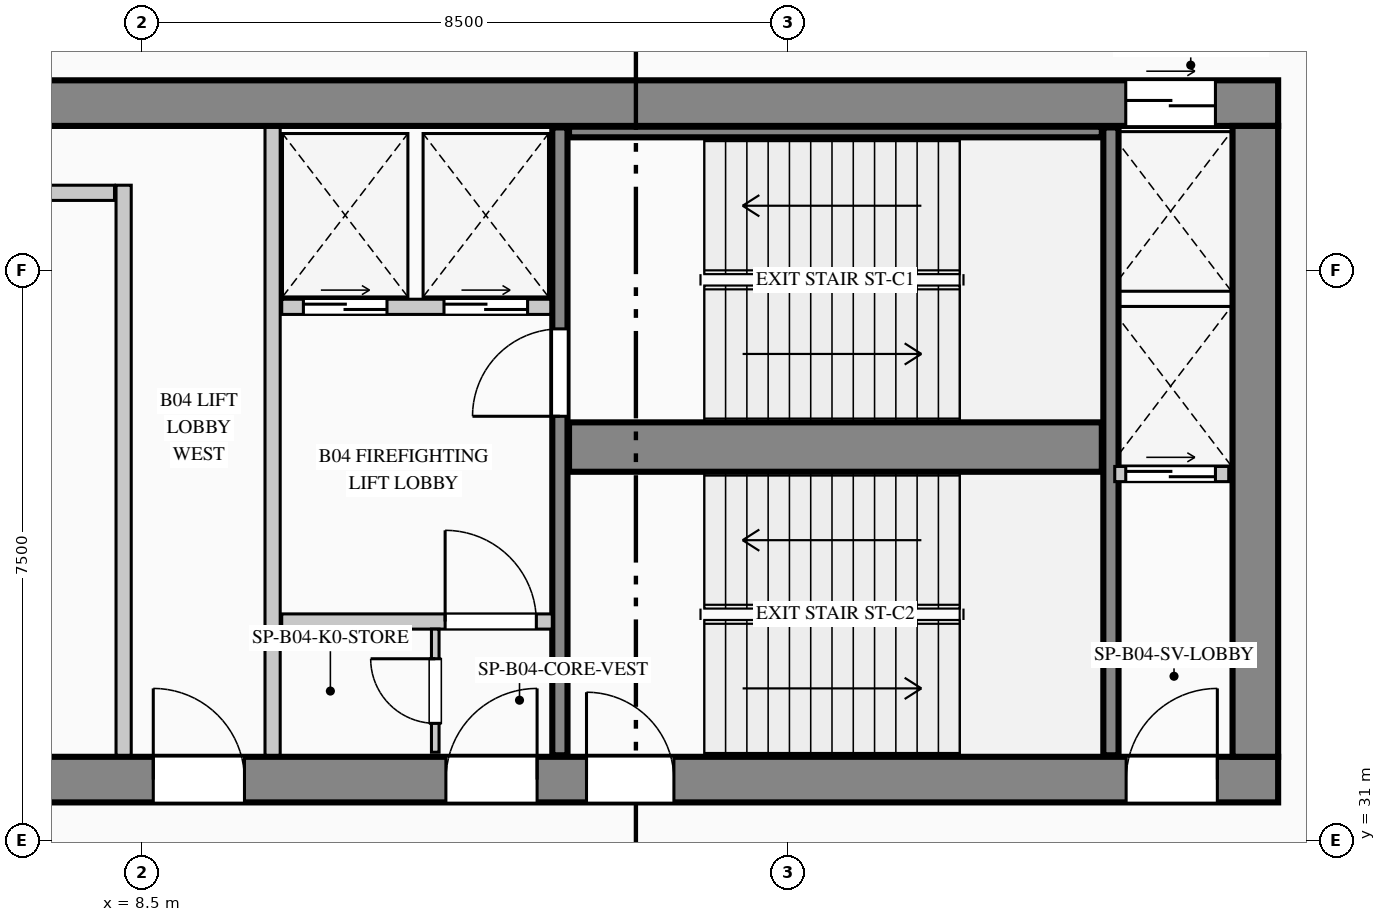
"""IFC4 building model, lengths in metres.
Left out: names, types, materials, properties, quantities, classifications, styles, units other than length and angle.
Written with IfcOpenShell. Run it as: python <this file> out.ifc"""

import sys

from ifc_helpers import new_model, si_unit, direction, frame, frame_2d, origin, place, context, subcontext, project, spatial, rectangle, extrude, element, fill, save


model = new_model("IFC4")
c1 = context("Model", 3, precision=1e-05, world=origin(), true_north=direction((0.0, 1.0)))
c2 = subcontext(c1, "Body", "Model", "MODEL_VIEW")
j1 = project(units=[si_unit("LENGTHUNIT", "METRE"), si_unit("PLANEANGLEUNIT", "RADIAN")], contexts=[c1])
p1 = place(None, origin())
s1 = spatial("IfcSite", under=j1, at=p1, CompositionType="ELEMENT")
p2 = place(p1, origin())
s2 = spatial("IfcBuilding", under=s1, at=p2, CompositionType="ELEMENT")
p3 = place(p2, frame((0.0, 0.0, -18.0)))
s3 = spatial("IfcBuildingStorey", under=s2, at=p3, CompositionType="ELEMENT", Elevation=-18.0)
p4 = place(p3, frame((5.4, 40.7, 0.0), z_axis=(0.0, 0.0, 1.0), x_axis=(1.0, 0.0, 0.0)))
e1 = element("IfcWall", 1, at=p4, inside=s3, PredefinedType="SHEAR", context=c2, shape_type="SweptSolid", body=[
    extrude(rectangle(XDim=18.05, YDim=0.6, at=frame_2d((9.025, 0.0))), origin(), (0.0, 0.0, 1.0), 4.5),
])
p5 = place(p4, frame((16.045, 0.0, 0.0)))
e2 = element("IfcOpeningElement", 2, at=p5, cuts=e1, PredefinedType="OPENING", context=c2, shape_type="SweptSolid", body=[
    extrude(rectangle(XDim=1.18, YDim=2.25, at=frame_2d((0.59, 1.125))), frame((0.0, 0.31, 0.0), z_axis=(0.0, -1.0, 0.0), x_axis=(1.0, 0.0, 0.0)), (0.0, 0.0, 1.0), 0.62),
])
p6 = place(p3, frame((5.4, 31.8, 0.0), z_axis=(0.0, 0.0, 1.0), x_axis=(1.0, 0.0, 0.0)))
e3 = element("IfcWall", 3, at=p6, inside=s3, PredefinedType="SHEAR", context=c2, shape_type="SweptSolid", body=[
    extrude(rectangle(XDim=18.05, YDim=0.6, at=frame_2d((9.025, 0.0))), origin(), (0.0, 0.0, 1.0), 4.5),
])
p7 = place(p6, frame((3.25, 0.0, 0.0)))
e4 = element("IfcOpeningElement", 4, at=p7, cuts=e3, PredefinedType="OPENING", context=c2, shape_type="SweptSolid", body=[
    extrude(rectangle(XDim=1.2, YDim=2.2, at=frame_2d((0.6, 1.1))), frame((0.0, 0.31, 0.0), z_axis=(0.0, -1.0, 0.0), x_axis=(1.0, 0.0, 0.0)), (0.0, 0.0, 1.0), 0.62),
])
p8 = place(p6, frame((7.1, 0.0, 0.0)))
e5 = element("IfcOpeningElement", 5, at=p8, cuts=e3, PredefinedType="OPENING", context=c2, shape_type="SweptSolid", body=[
    extrude(rectangle(XDim=1.2, YDim=2.2, at=frame_2d((0.6, 1.1))), frame((0.0, 0.31, 0.0), z_axis=(0.0, -1.0, 0.0), x_axis=(1.0, 0.0, 0.0)), (0.0, 0.0, 1.0), 0.62),
])
p9 = place(p6, frame((8.95, 0.0, 0.0)))
e6 = element("IfcOpeningElement", 6, at=p9, cuts=e3, PredefinedType="OPENING", context=c2, shape_type="SweptSolid", body=[
    extrude(rectangle(XDim=1.15, YDim=2.2, at=frame_2d((0.575, 1.1))), frame((0.0, 0.31, 0.0), z_axis=(0.0, -1.0, 0.0), x_axis=(1.0, 0.0, 0.0)), (0.0, 0.0, 1.0), 0.62),
])
p10 = place(p6, frame((16.05, 0.0, 0.0)))
e7 = element("IfcOpeningElement", 7, at=p10, cuts=e3, PredefinedType="OPENING", context=c2, shape_type="SweptSolid", body=[
    extrude(rectangle(XDim=1.2, YDim=2.2, at=frame_2d((0.6, 1.1))), frame((0.0, 0.31, 0.0), z_axis=(0.0, -1.0, 0.0), x_axis=(1.0, 0.0, 0.0)), (0.0, 0.0, 1.0), 0.62),
])
p11 = place(p3, frame((23.15, 32.1, 0.0), z_axis=(0.0, 0.0, 1.0), x_axis=(0.0, 1.0, 0.0)))
e8 = element("IfcWall", 8, at=p11, inside=s3, PredefinedType="SHEAR", context=c2, shape_type="SweptSolid", body=[
    extrude(rectangle(XDim=8.3, YDim=0.6, at=frame_2d((4.15, 0.0))), origin(), (0.0, 0.0, 1.0), 4.5),
])
p12 = place(p3, frame((14.0, 32.12, 0.0), z_axis=(0.0, 0.0, 1.0), x_axis=(0.0, 1.0, 0.0)))
e9 = element("IfcWall", 9, at=p12, inside=s3, PredefinedType="SHEAR", context=c2, shape_type="SweptSolid", body=[
    extrude(rectangle(XDim=8.26, YDim=0.2, at=frame_2d((4.13, 0.0))), origin(), (0.0, 0.0, 1.0), 4.5),
])
p13 = place(p12, frame((4.46, 0.0, 0.0)))
e10 = element("IfcOpeningElement", 10, at=p13, cuts=e9, PredefinedType="OPENING", context=c2, shape_type="SweptSolid", body=[
    extrude(rectangle(XDim=1.15, YDim=2.2, at=frame_2d((0.575, 1.1))), frame((0.0, 0.11, 0.0), z_axis=(0.0, -1.0, 0.0), x_axis=(1.0, 0.0, 0.0)), (0.0, 0.0, 1.0), 0.22),
])
p14 = place(p3, frame((14.12, 36.175, 0.0), z_axis=(0.0, 0.0, 1.0), x_axis=(1.0, 0.0, 0.0)))
e11 = element("IfcWall", 11, at=p14, inside=s3, PredefinedType="SHEAR", context=c2, shape_type="SweptSolid", body=[
    extrude(rectangle(XDim=7.01, YDim=0.65, at=frame_2d((3.505, 0.0))), origin(), (0.0, 0.0, 1.0), 4.5),
])
p15 = place(p3, frame((21.25, 32.12, 0.0), z_axis=(0.0, 0.0, 1.0), x_axis=(0.0, 1.0, 0.0)))
e12 = element("IfcWall", 12, at=p15, inside=s3, PredefinedType="SHEAR", context=c2, shape_type="SweptSolid", body=[
    extrude(rectangle(XDim=8.26, YDim=0.2, at=frame_2d((4.13, 0.0))), origin(), (0.0, 0.0, 1.0), 4.5),
])
p16 = place(p3, frame((14.12, 40.32, 0.0), z_axis=(0.0, 0.0, 1.0), x_axis=(1.0, 0.0, 0.0)))
e13 = element("IfcWall", 13, at=p16, inside=s3, PredefinedType="SHEAR", context=c2, shape_type="SweptSolid", body=[
    extrude(rectangle(XDim=7.01, YDim=0.14, at=frame_2d((3.505, 0.0))), origin(), (0.0, 0.0, 1.0), 4.5),
])
p17 = place(p3, frame((8.26, 32.12, 0.0), z_axis=(0.0, 0.0, 1.0), x_axis=(0.0, 1.0, 0.0)))
e14 = element("IfcWall", 14, at=p17, inside=s3, PredefinedType="PARTITIONING", context=c2, shape_type="SweptSolid", body=[
    extrude(rectangle(XDim=7.5, YDim=0.2, at=frame_2d((3.75, 0.0))), origin(), (0.0, 0.0, 1.0), 4.135),
])
p18 = place(p3, frame((6.02, 39.52, 0.0), z_axis=(0.0, 0.0, 1.0), x_axis=(1.0, 0.0, 0.0)))
e15 = element("IfcWall", 15, at=p18, inside=s3, PredefinedType="PARTITIONING", context=c2, shape_type="SweptSolid", body=[
    extrude(rectangle(XDim=2.12, YDim=0.2, at=frame_2d((1.06, 0.0))), origin(), (0.0, 0.0, 1.0), 4.135),
])
p19 = place(p3, frame((10.22, 32.12, 0.0), z_axis=(0.0, 0.0, 1.0), x_axis=(0.0, 1.0, 0.0)))
e16 = element("IfcWall", 16, at=p19, inside=s3, PredefinedType="PARTITIONING", context=c2, shape_type="SweptSolid", body=[
    extrude(rectangle(XDim=8.26, YDim=0.2, at=frame_2d((4.13, 0.0))), origin(), (0.0, 0.0, 1.0), 4.135),
])
p20 = place(p3, frame((10.34, 38.02, 0.0), z_axis=(0.0, 0.0, 1.0), x_axis=(1.0, 0.0, 0.0)))
e17 = element("IfcWall", 17, at=p20, inside=s3, PredefinedType="PARTITIONING", context=c2, shape_type="SweptSolid", body=[
    extrude(rectangle(XDim=3.54, YDim=0.2, at=frame_2d((1.77, 0.0))), origin(), (0.0, 0.0, 1.0), 4.135),
])
p21 = place(p20, frame((0.285, 0.0, 0.0)))
e18 = element("IfcOpeningElement", 18, at=p21, cuts=e17, PredefinedType="OPENING", context=c2, shape_type="SweptSolid", body=[
    extrude(rectangle(XDim=1.1, YDim=2.2, at=frame_2d((0.55, 1.1))), frame((0.0, 0.11, 0.0), z_axis=(0.0, -1.0, 0.0), x_axis=(1.0, 0.0, 0.0)), (0.0, 0.0, 1.0), 0.22),
])
p22 = place(p20, frame((2.135, 0.0, 0.0)))
e19 = element("IfcOpeningElement", 19, at=p22, cuts=e17, PredefinedType="OPENING", context=c2, shape_type="SweptSolid", body=[
    extrude(rectangle(XDim=1.1, YDim=2.2, at=frame_2d((0.55, 1.1))), frame((0.0, 0.11, 0.0), z_axis=(0.0, -1.0, 0.0), x_axis=(1.0, 0.0, 0.0)), (0.0, 0.0, 1.0), 0.22),
])
p23 = place(p3, frame((10.34, 33.88, 0.0), z_axis=(0.0, 0.0, 1.0), x_axis=(1.0, 0.0, 0.0)))
e20 = element("IfcWall", 20, at=p23, inside=s3, PredefinedType="PARTITIONING", context=c2, shape_type="SweptSolid", body=[
    extrude(rectangle(XDim=3.56, YDim=0.2, at=frame_2d((1.78, 0.0))), origin(), (0.0, 0.0, 1.0), 4.135),
])
p24 = place(p23, frame((2.15, 0.0, 0.0)))
e21 = element("IfcOpeningElement", 21, at=p24, cuts=e20, PredefinedType="OPENING", context=c2, shape_type="SweptSolid", body=[
    extrude(rectangle(XDim=1.2, YDim=2.2, at=frame_2d((0.6, 1.1))), frame((0.0, 0.11, 0.0), z_axis=(0.0, -1.0, 0.0), x_axis=(1.0, 0.0, 0.0)), (0.0, 0.0, 1.0), 0.22),
])
p25 = place(p3, frame((12.36, 32.16, 0.0), z_axis=(0.0, 0.0, 1.0), x_axis=(0.0, 1.0, 0.0)))
e22 = element("IfcWall", 22, at=p25, inside=s3, PredefinedType="PARTITIONING", context=c2, shape_type="SweptSolid", body=[
    extrude(rectangle(XDim=1.62, YDim=0.1, at=frame_2d((0.81, 0.0))), origin(), (0.0, 0.0, 1.0), 4.135),
])
p26 = place(p25, frame((0.38, 0.0, 0.0)))
e23 = element("IfcOpeningElement", 23, at=p26, cuts=e22, PredefinedType="OPENING", context=c2, shape_type="SweptSolid", body=[
    extrude(rectangle(XDim=0.85, YDim=2.1, at=frame_2d((0.425, 1.05))), frame((0.0, 0.06, 0.0), z_axis=(0.0, -1.0, 0.0), x_axis=(1.0, 0.0, 0.0)), (0.0, 0.0, 1.0), 0.12),
])
p27 = place(p3, frame((21.3, 35.82, 0.0), z_axis=(0.0, 0.0, 1.0), x_axis=(1.0, 0.0, 0.0)))
e24 = element("IfcWall", 24, at=p27, inside=s3, PredefinedType="PARTITIONING", context=c2, shape_type="SweptSolid", body=[
    extrude(rectangle(XDim=1.5, YDim=0.2, at=frame_2d((0.75, 0.0))), origin(), (0.0, 0.0, 1.0), 4.135),
])
p28 = place(p27, frame((0.145, 0.0, 0.0)))
e25 = element("IfcOpeningElement", 25, at=p28, cuts=e24, PredefinedType="OPENING", context=c2, shape_type="SweptSolid", body=[
    extrude(rectangle(XDim=1.18, YDim=2.25, at=frame_2d((0.59, 1.125))), frame((0.0, 0.11, 0.0), z_axis=(0.0, -1.0, 0.0), x_axis=(1.0, 0.0, 0.0)), (0.0, 0.0, 1.0), 0.22),
])
p29 = place(p7, origin())
e26 = element("IfcDoor", 26, at=p29, inside=s3, OperationType="SINGLE_SWING_LEFT", PredefinedType="DOOR", context=c2, shape_type="SweptSolid", body=[
    extrude(rectangle(XDim=1.2, YDim=2.2, at=frame_2d((0.6, 1.1))), frame((0.0, 0.025, 0.0), z_axis=(0.0, -1.0, 0.0), x_axis=(1.0, 0.0, 0.0)), (0.0, 0.0, 1.0), 0.05),
])
fill(e4, e26)
p30 = place(p8, origin())
e27 = element("IfcDoor", 27, at=p30, inside=s3, OperationType="SINGLE_SWING_RIGHT", PredefinedType="DOOR", context=c2, shape_type="SweptSolid", body=[
    extrude(rectangle(XDim=1.2, YDim=2.2, at=frame_2d((0.6, 1.1))), frame((0.0, 0.025, 0.0), z_axis=(0.0, -1.0, 0.0), x_axis=(1.0, 0.0, 0.0)), (0.0, 0.0, 1.0), 0.05),
])
fill(e5, e27)
p31 = place(p9, origin())
e28 = element("IfcDoor", 28, at=p31, inside=s3, OperationType="SINGLE_SWING_LEFT", PredefinedType="DOOR", context=c2, shape_type="SweptSolid", body=[
    extrude(rectangle(XDim=1.15, YDim=2.2, at=frame_2d((0.575, 1.1))), frame((0.0, 0.025, 0.0), z_axis=(0.0, -1.0, 0.0), x_axis=(1.0, 0.0, 0.0)), (0.0, 0.0, 1.0), 0.05),
])
fill(e6, e28)
p32 = place(p10, origin())
e29 = element("IfcDoor", 29, at=p32, inside=s3, OperationType="SINGLE_SWING_RIGHT", PredefinedType="DOOR", context=c2, shape_type="SweptSolid", body=[
    extrude(rectangle(XDim=1.2, YDim=2.2, at=frame_2d((0.6, 1.1))), frame((0.0, 0.025, 0.0), z_axis=(0.0, -1.0, 0.0), x_axis=(1.0, 0.0, 0.0)), (0.0, 0.0, 1.0), 0.05),
])
fill(e7, e29)
p33 = place(p24, origin())
e30 = element("IfcDoor", 30, at=p33, inside=s3, OperationType="SINGLE_SWING_LEFT", PredefinedType="DOOR", context=c2, shape_type="SweptSolid", body=[
    extrude(rectangle(XDim=1.2, YDim=2.2, at=frame_2d((0.6, 1.1))), frame((0.0, 0.025, 0.0), z_axis=(0.0, -1.0, 0.0), x_axis=(1.0, 0.0, 0.0)), (0.0, 0.0, 1.0), 0.05),
])
fill(e21, e30)
p34 = place(p26, origin())
e31 = element("IfcDoor", 31, at=p34, inside=s3, OperationType="SINGLE_SWING_RIGHT", PredefinedType="DOOR", context=c2, shape_type="SweptSolid", body=[
    extrude(rectangle(XDim=0.85, YDim=2.1, at=frame_2d((0.425, 1.05))), frame((0.0, 0.025, 0.0), z_axis=(0.0, -1.0, 0.0), x_axis=(1.0, 0.0, 0.0)), (0.0, 0.0, 1.0), 0.05),
])
fill(e23, e31)
p35 = place(p13, origin())
e32 = element("IfcDoor", 32, at=p35, inside=s3, OperationType="SINGLE_SWING_LEFT", PredefinedType="DOOR", context=c2, shape_type="SweptSolid", body=[
    extrude(rectangle(XDim=1.15, YDim=2.2, at=frame_2d((0.575, 1.1))), frame((0.0, 0.025, 0.0), z_axis=(0.0, -1.0, 0.0), x_axis=(1.0, 0.0, 0.0)), (0.0, 0.0, 1.0), 0.05),
])
fill(e10, e32)
p36 = place(p21, origin())
e33 = element("IfcDoor", 33, at=p36, inside=s3, OperationType="DOUBLE_DOOR_SLIDING", PredefinedType="DOOR", context=c2, shape_type="SweptSolid", body=[
    extrude(rectangle(XDim=1.1, YDim=2.2, at=frame_2d((0.55, 1.1))), frame((0.0, 0.025, 0.0), z_axis=(0.0, -1.0, 0.0), x_axis=(1.0, 0.0, 0.0)), (0.0, 0.0, 1.0), 0.05),
])
fill(e18, e33)
p37 = place(p22, origin())
e34 = element("IfcDoor", 34, at=p37, inside=s3, OperationType="DOUBLE_DOOR_SLIDING", PredefinedType="DOOR", context=c2, shape_type="SweptSolid", body=[
    extrude(rectangle(XDim=1.1, YDim=2.2, at=frame_2d((0.55, 1.1))), frame((0.0, 0.025, 0.0), z_axis=(0.0, -1.0, 0.0), x_axis=(1.0, 0.0, 0.0)), (0.0, 0.0, 1.0), 0.05),
])
fill(e19, e34)
p38 = place(p5, origin())
e35 = element("IfcDoor", 35, at=p38, inside=s3, OperationType="DOUBLE_DOOR_SLIDING", PredefinedType="DOOR", context=c2, shape_type="SweptSolid", body=[
    extrude(rectangle(XDim=1.18, YDim=2.25, at=frame_2d((0.59, 1.125))), frame((0.0, 0.025, 0.0), z_axis=(0.0, -1.0, 0.0), x_axis=(1.0, 0.0, 0.0)), (0.0, 0.0, 1.0), 0.05),
])
fill(e2, e35)
p39 = place(p28, origin())
e36 = element("IfcDoor", 36, at=p39, inside=s3, OperationType="DOUBLE_DOOR_SLIDING", PredefinedType="DOOR", context=c2, shape_type="SweptSolid", body=[
    extrude(rectangle(XDim=1.18, YDim=2.25, at=frame_2d((0.59, 1.125))), frame((0.0, 0.025, 0.0), z_axis=(0.0, -1.0, 0.0), x_axis=(1.0, 0.0, 0.0)), (0.0, 0.0, 1.0), 0.05),
])
fill(e25, e36)
save(model, sys.argv[1])
